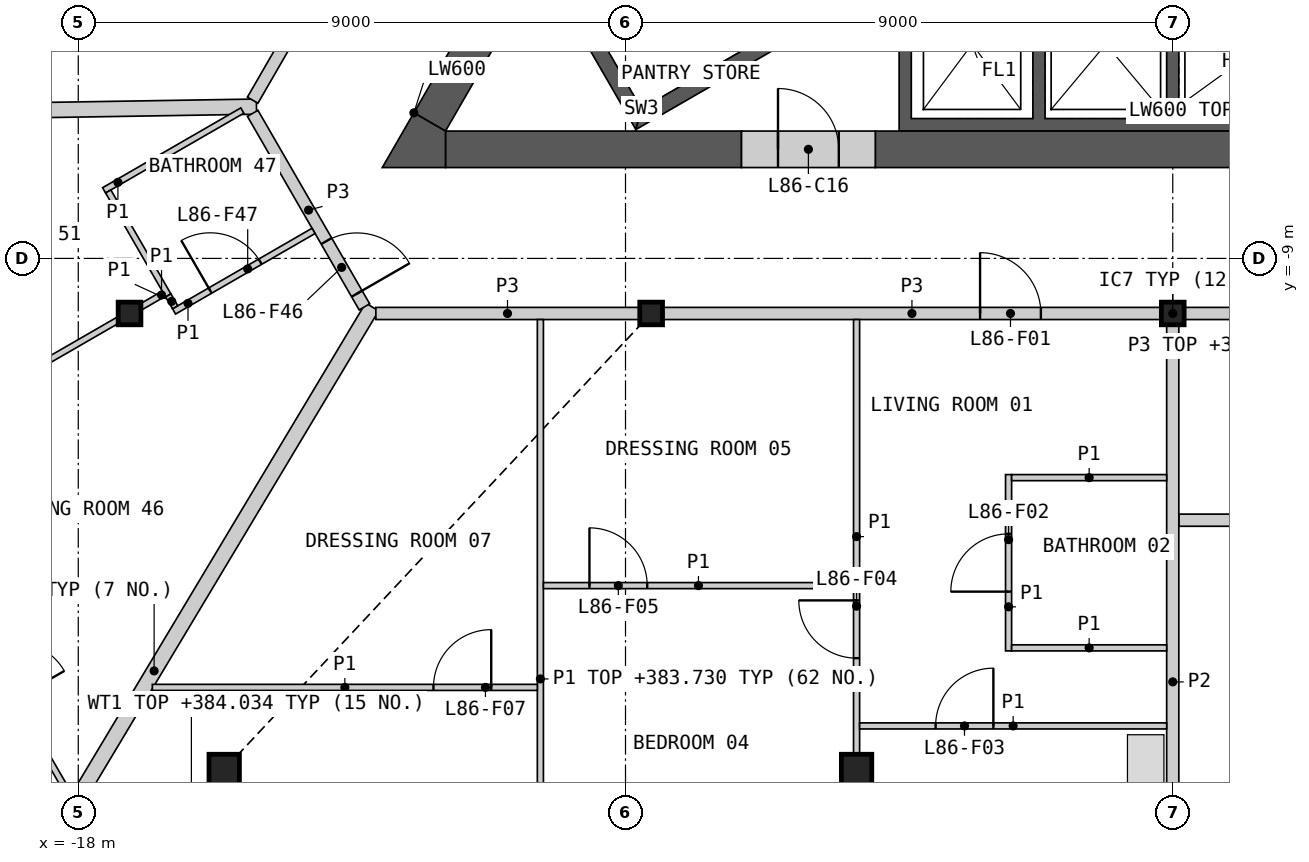
"""IFC4 building model, lengths in metres.
Left out: names, types, materials, properties, quantities, classifications, styles, units other than length and angle.
Written with IfcOpenShell. Run it as: python <this file> out.ifc"""

import sys

from ifc_helpers import new_model, si_unit, direction, frame, frame_2d, origin, origin_2d, place, context, subcontext, project, spatial, polyline, rectangle, hollow_rectangle, i_section, outline, extrude, element, fill, save


model = new_model("IFC4")
c1 = context("Model", 3, precision=1e-05, world=origin(), true_north=direction((0.0, 1.0)))
c2 = subcontext(c1, "Body", "Model", "MODEL_VIEW")
j1 = project(units=[si_unit("LENGTHUNIT", "METRE"), si_unit("PLANEANGLEUNIT", "RADIAN")], contexts=[c1])
p1 = place(None, origin())
s1 = spatial("IfcSite", under=j1, at=p1, CompositionType="ELEMENT")
p2 = place(p1, origin())
s2 = spatial("IfcBuilding", under=s1, at=p2, CompositionType="ELEMENT")
p3 = place(p2, frame((0.0, 0.0, 381.4)))
s3 = spatial("IfcBuildingStorey", under=s2, at=p3, CompositionType="ELEMENT", Elevation=381.4)
for number, where, z_axis, x_axis in (
    (1, (-15.6, -17.406, 0.0), (0.0, 0.0, 1.0), (1.0, 0.0, 0.0)),
    (2, (-5.2, -17.406, 0.0), (0.0, 0.0, 1.0), (1.0, 0.0, 0.0)),
):
    element("IfcColumn", number, at=place(p3, frame(where, z_axis=z_axis, x_axis=x_axis)), inside=s3, PredefinedType="COLUMN", context=c2, shape_type="SweptSolid", body=[
        extrude(hollow_rectangle(XDim=0.5, YDim=0.5, WallThickness=0.03, at=origin_2d()), origin(), (0.0, 0.0, 1.0), 3.4),
    ])
for number, where, z_axis, x_axis in (
    (3, (-17.157, -9.906, 0.0), (0.0, 0.0, 1.0), (1.0, 0.0, 0.0)),
    (4, (-8.578, -9.906, 0.0), (0.0, 0.0, 1.0), (1.0, 0.0, 0.0)),
    (5, (0.0, -9.906, 0.0), (0.0, 0.0, 1.0), (1.0, 0.0, 0.0)),
):
    element("IfcColumn", number, at=place(p3, frame(where, z_axis=z_axis, x_axis=x_axis)), inside=s3, PredefinedType="COLUMN", context=c2, shape_type="SweptSolid", body=[
        extrude(i_section(OverallWidth=0.374, OverallDepth=0.372, WebThickness=0.016, FlangeThickness=0.026, at=origin_2d()), origin(), (0.0, 0.0, 1.0), 3.4),
    ])
p4 = place(p3, origin())
e6 = element("IfcWall", 6, at=p4, inside=s3, PredefinedType="SHEAR", context=c2, shape_type="SweptSolid", body=[
    extrude(outline(polyline([(4.5, -4.4), (4.5, -6.906), (-4.5, -6.906), (-4.5, -4.4), (-4.3, -4.4), (-4.3, -6.7), (-2.3, -6.7), (-2.3, -4.4), (-2.1, -4.4), (-2.1, -6.7), (-0.1, -6.7), (-0.1, -4.4), (0.1, -4.4), (0.1, -6.7), (2.1, -6.7), (2.1, -4.4), (2.3, -4.4), (2.3, -6.7), (4.3, -6.7), (4.3, -4.4), (4.5, -4.4)])), origin(), (0.0, 0.0, 1.0), 3.1),
])
p5 = place(p3, origin())
e7 = element("IfcWall", 7, at=p5, inside=s3, PredefinedType="SHEAR", context=c2, shape_type="SweptSolid", body=[
    extrude(outline(polyline([(-10.374, -4.206), (-8.83, -6.881), (-8.738, -6.539), (-10.032, -4.298), (-10.374, -4.206)])), origin(), (0.0, 0.0, 1.0), 3.1),
])
p6 = place(p3, origin())
e8 = element("IfcWall", 8, at=p6, inside=s3, PredefinedType="SHEAR", context=c2, shape_type="SweptSolid", body=[
    extrude(outline(polyline([(-8.738, -6.539), (-8.83, -6.881), (-3.763, -3.956), (-3.888, -3.739), (-8.738, -6.539)])), origin(), (0.0, 0.0, 1.0), 3.1),
])
p7 = place(p3, frame((-4.892, -7.206, 0.0), z_axis=(0.0, 0.0, 1.0), x_axis=(1.0, 0.0, 0.0)))
e9 = element("IfcWall", 9, at=p7, inside=s3, PredefinedType="SHEAR", context=c2, shape_type="SweptSolid", body=[
    extrude(rectangle(XDim=14.261, YDim=0.6, at=frame_2d((7.13, 0.0))), origin(), (0.0, 0.0, 1.0), 3.1),
])
p8 = place(p3, frame((-11.961, -7.206, 0.0), z_axis=(0.0, 0.0, 1.0), x_axis=(1.0, 0.0, 0.0)))
e10 = element("IfcWall", 10, at=p8, inside=s3, PredefinedType="SHEAR", context=c2, shape_type="SweptSolid", body=[
    extrude(rectangle(XDim=4.868, YDim=0.6, at=frame_2d((2.434, 0.0))), origin(), (0.0, 0.0, 1.0), 3.1),
])
p9 = place(p3, frame((-9.562, -2.15, 0.0), z_axis=(0.0, 0.0, 1.0), x_axis=(-0.500015214976, -0.866016619236, 0.0)))
e11 = element("IfcWall", 11, at=p9, inside=s3, PredefinedType="SHEAR", context=c2, shape_type="SweptSolid", body=[
    extrude(rectangle(XDim=5.318, YDim=0.6, at=frame_2d((2.659, 0.0))), origin(), (0.0, 0.0, 1.0), 3.1),
])
p10 = place(p3, origin())
e12 = element("IfcWall", 12, at=p10, inside=s3, PredefinedType="SHEAR", context=c2, shape_type="SweptSolid", body=[
    extrude(outline(polyline([(-12.48, -6.606), (-11.961, -6.906), (-11.961, -7.506), (-13.0, -7.506), (-12.48, -6.606)])), origin(), (0.0, 0.0, 1.0), 3.1),
])
p11 = place(p3, frame((-7.092, -7.206, 0.0), z_axis=(0.0, 0.0, 1.0), x_axis=(1.0, 0.0, 0.0)))
e13 = element("IfcWall", 13, at=p11, inside=s3, PredefinedType="SHEAR", context=c2, shape_type="SweptSolid", body=[
    extrude(rectangle(XDim=2.2, YDim=0.6, at=frame_2d((1.1, 0.0))), origin(), (0.0, 0.0, 1.0), 3.1),
])
p12 = place(p11, frame((0.6, 0.0, 0.0)))
e14 = element("IfcOpeningElement", 14, at=p12, cuts=e13, PredefinedType="OPENING", context=c2, shape_type="SweptSolid", body=[
    extrude(rectangle(XDim=1.0, YDim=2.1, at=frame_2d((0.5, 1.05))), frame((0.0, 0.31, 0.0), z_axis=(0.0, -1.0, 0.0), x_axis=(1.0, 0.0, 0.0)), (0.0, 0.0, 1.0), 0.62),
])
p13 = place(p3, frame((-20.338, -21.771, 0.0), z_axis=(0.0, 0.0, 1.0), x_axis=(0.513878217441, 0.857863146218, 0.0)))
e15 = element("IfcWall", 15, at=p13, inside=s3, PredefinedType="PARTITIONING", context=c2, shape_type="SweptSolid", body=[
    extrude(rectangle(XDim=13.956, YDim=0.25, at=frame_2d((6.978, 0.0))), origin(), (0.0, 0.0, 1.0), 2.33),
])
p14 = place(p3, frame((-29.269, -6.732, 0.0), z_axis=(0.0, 0.0, 1.0), x_axis=(0.999870533117, 0.016090898164, 0.0)))
e16 = element("IfcWall", 16, at=p14, inside=s3, PredefinedType="PARTITIONING", context=c2, shape_type="SweptSolid", body=[
    extrude(rectangle(XDim=14.202, YDim=0.25, at=frame_2d((7.101, 0.0))), origin(), (0.0, 0.0, 1.0), 2.33),
])
p15 = place(p3, frame((0.197, -9.906, 0.0), z_axis=(0.0, 0.0, 1.0), x_axis=(1.0, 0.0, 0.0)))
e17 = element("IfcWall", 17, at=p15, inside=s3, PredefinedType="PARTITIONING", context=c2, shape_type="SweptSolid", body=[
    extrude(rectangle(XDim=8.185, YDim=0.2, at=frame_2d((4.092, 0.0))), origin(), (0.0, 0.0, 1.0), 3.1),
])
p16 = place(p15, frame((3.567, 0.0, 0.0)))
e18 = element("IfcOpeningElement", 18, at=p16, cuts=e17, PredefinedType="OPENING", context=c2, shape_type="SweptSolid", body=[
    extrude(rectangle(XDim=0.95, YDim=2.1, at=frame_2d((0.475, 1.05))), frame((0.0, 0.11, 0.0), z_axis=(0.0, -1.0, 0.0), x_axis=(1.0, 0.0, 0.0)), (0.0, 0.0, 1.0), 0.22),
])
p17 = place(p3, frame((-8.382, -9.906, 0.0), z_axis=(0.0, 0.0, 1.0), x_axis=(1.0, 0.0, 0.0)))
e19 = element("IfcWall", 19, at=p17, inside=s3, PredefinedType="PARTITIONING", context=c2, shape_type="SweptSolid", body=[
    extrude(rectangle(XDim=8.185, YDim=0.2, at=frame_2d((4.092, 0.0))), origin(), (0.0, 0.0, 1.0), 3.1),
])
p18 = place(p17, frame((5.213, 0.0, 0.0)))
e20 = element("IfcOpeningElement", 20, at=p18, cuts=e19, PredefinedType="OPENING", context=c2, shape_type="SweptSolid", body=[
    extrude(rectangle(XDim=1.0, YDim=2.1, at=frame_2d((0.5, 1.05))), frame((0.0, 0.11, 0.0), z_axis=(0.0, -1.0, 0.0), x_axis=(1.0, 0.0, 0.0)), (0.0, 0.0, 1.0), 0.22),
])
p19 = place(p3, frame((-13.106, -9.906, 0.0), z_axis=(0.0, 0.0, 1.0), x_axis=(1.0, 0.0, 0.0)))
e21 = element("IfcWall", 21, at=p19, inside=s3, PredefinedType="PARTITIONING", context=c2, shape_type="SweptSolid", body=[
    extrude(rectangle(XDim=4.331, YDim=0.2, at=frame_2d((2.165, 0.0))), origin(), (0.0, 0.0, 1.0), 3.1),
])
p20 = place(p3, frame((-15.131, -6.397, 0.0), z_axis=(0.0, 0.0, 1.0), x_axis=(0.499986217557, 0.866033360935, 0.0)))
e22 = element("IfcWall", 22, at=p20, inside=s3, PredefinedType="PARTITIONING", context=c2, shape_type="SweptSolid", body=[
    extrude(rectangle(XDim=4.3, YDim=0.2, at=frame_2d((2.15, 0.0))), origin(), (0.0, 0.0, 1.0), 3.1),
])
p21 = place(p3, frame((-15.131, -6.614, 0.0), z_axis=(0.0, 0.0, 1.0), x_axis=(0.499967746641, -0.866044024469, 0.0)))
e23 = element("IfcWall", 23, at=p21, inside=s3, PredefinedType="PARTITIONING", context=c2, shape_type="SweptSolid", body=[
    extrude(rectangle(XDim=3.676, YDim=0.2, at=frame_2d((1.838, 0.0))), origin(), (0.0, 0.0, 1.0), 3.1),
])
p22 = place(p21, frame((2.426, 0.0, 0.0)))
e24 = element("IfcOpeningElement", 24, at=p22, cuts=e23, PredefinedType="OPENING", context=c2, shape_type="SweptSolid", body=[
    extrude(rectangle(XDim=1.0, YDim=2.1, at=frame_2d((0.5, 1.05))), frame((0.0, 0.11, 0.0), z_axis=(0.0, -1.0, 0.0), x_axis=(1.0, 0.0, 0.0)), (0.0, 0.0, 1.0), 0.22),
])
p23 = place(p3, frame((0.1, -13.306, 0.0), z_axis=(0.0, 0.0, 1.0), x_axis=(1.0, 0.0, 0.0)))
e25 = element("IfcWall", 25, at=p23, inside=s3, PredefinedType="PARTITIONING", context=c2, shape_type="SweptSolid", body=[
    extrude(rectangle(XDim=15.094, YDim=0.2, at=frame_2d((7.547, 0.0))), origin(), (0.0, 0.0, 1.0), 2.33),
])
p24 = place(p23, frame((9.781, 0.0, 0.0)))
e26 = element("IfcOpeningElement", 26, at=p24, cuts=e25, PredefinedType="OPENING", context=c2, shape_type="SweptSolid", body=[
    extrude(rectangle(XDim=0.95, YDim=2.1, at=frame_2d((0.475, 1.05))), frame((0.0, 0.11, 0.0), z_axis=(0.0, -1.0, 0.0), x_axis=(1.0, 0.0, 0.0)), (0.0, 0.0, 1.0), 0.22),
])
p25 = place(p3, frame((0.0, -21.828, 0.0), z_axis=(0.0, 0.0, 1.0), x_axis=(0.0, 1.0, 0.0)))
e27 = element("IfcWall", 27, at=p25, inside=s3, PredefinedType="PARTITIONING", context=c2, shape_type="SweptSolid", body=[
    extrude(rectangle(XDim=11.725, YDim=0.2, at=frame_2d((5.863, 0.0))), origin(), (0.0, 0.0, 1.0), 2.33),
])
p26 = place(p3, frame((-10.4, -21.828, 0.0), z_axis=(0.0, 0.0, 1.0), x_axis=(0.0, 1.0, 0.0)))
e28 = element("IfcWall", 28, at=p26, inside=s3, PredefinedType="PARTITIONING", context=c2, shape_type="SweptSolid", body=[
    extrude(rectangle(XDim=11.822, YDim=0.1, at=frame_2d((5.911, 0.0))), origin(), (0.0, 0.0, 1.0), 2.33),
])
p27 = place(p26, frame((1.156, 0.0, 0.0)))
e29 = element("IfcOpeningElement", 29, at=p27, cuts=e28, PredefinedType="OPENING", context=c2, shape_type="SweptSolid", body=[
    extrude(rectangle(XDim=0.95, YDim=2.1, at=frame_2d((0.475, 1.05))), frame((0.0, 0.06, 0.0), z_axis=(0.0, -1.0, 0.0), x_axis=(1.0, 0.0, 0.0)), (0.0, 0.0, 1.0), 0.12),
])
p28 = place(p3, frame((-26.777, -15.46, 0.0), z_axis=(0.0, 0.0, 1.0), x_axis=(0.866019680922, 0.500009912158, 0.0)))
e30 = element("IfcWall", 30, at=p28, inside=s3, PredefinedType="PARTITIONING", context=c2, shape_type="SweptSolid", body=[
    extrude(rectangle(XDim=10.881, YDim=0.1, at=frame_2d((5.44, 0.0))), origin(), (0.0, 0.0, 1.0), 2.33),
])
p29 = place(p28, frame((1.454, 0.0, 0.0)))
e31 = element("IfcOpeningElement", 31, at=p29, cuts=e30, PredefinedType="OPENING", context=c2, shape_type="SweptSolid", body=[
    extrude(rectangle(XDim=0.95, YDim=2.1, at=frame_2d((0.475, 1.05))), frame((0.0, 0.06, 0.0), z_axis=(0.0, -1.0, 0.0), x_axis=(1.0, 0.0, 0.0)), (0.0, 0.0, 1.0), 0.12),
])
p30 = place(p3, frame((-5.2, -17.146, 0.0), z_axis=(0.0, 0.0, 1.0), x_axis=(0.0, 1.0, 0.0)))
e32 = element("IfcWall", 32, at=p30, inside=s3, PredefinedType="PARTITIONING", context=c2, shape_type="SweptSolid", body=[
    extrude(rectangle(XDim=7.14, YDim=0.1, at=frame_2d((3.57, 0.0))), origin(), (0.0, 0.0, 1.0), 2.33),
])
p31 = place(p30, frame((1.571, 0.0, 0.0)))
e33 = element("IfcOpeningElement", 33, at=p31, cuts=e32, PredefinedType="OPENING", context=c2, shape_type="SweptSolid", body=[
    extrude(rectangle(XDim=0.95, YDim=2.1, at=frame_2d((0.475, 1.05))), frame((0.0, 0.06, 0.0), z_axis=(0.0, -1.0, 0.0), x_axis=(1.0, 0.0, 0.0)), (0.0, 0.0, 1.0), 0.12),
])
p32 = place(p3, frame((-21.304, -12.358, 0.0), z_axis=(0.0, 0.0, 1.0), x_axis=(0.500000558108, -0.866025081561, 0.0)))
e34 = element("IfcWall", 34, at=p32, inside=s3, PredefinedType="PARTITIONING", context=c2, shape_type="SweptSolid", body=[
    extrude(rectangle(XDim=6.358, YDim=0.1, at=frame_2d((3.179, 0.0))), origin(), (0.0, 0.0, 1.0), 2.33),
])
p33 = place(p32, frame((3.555, 0.0, 0.0)))
e35 = element("IfcOpeningElement", 35, at=p33, cuts=e34, PredefinedType="OPENING", context=c2, shape_type="SweptSolid", body=[
    extrude(rectangle(XDim=0.95, YDim=2.1, at=frame_2d((0.475, 1.05))), frame((0.0, 0.06, 0.0), z_axis=(0.0, -1.0, 0.0), x_axis=(1.0, 0.0, 0.0)), (0.0, 0.0, 1.0), 0.12),
])
p34 = place(p3, frame((-16.781, -16.055, 0.0), z_axis=(0.0, 0.0, 1.0), x_axis=(1.0, 0.0, 0.0)))
e36 = element("IfcWall", 36, at=p34, inside=s3, PredefinedType="PARTITIONING", context=c2, shape_type="SweptSolid", body=[
    extrude(rectangle(XDim=6.332, YDim=0.1, at=frame_2d((3.166, 0.0))), origin(), (0.0, 0.0, 1.0), 2.33),
])
p35 = place(p34, frame((4.623, 0.0, 0.0)))
e37 = element("IfcOpeningElement", 37, at=p35, cuts=e36, PredefinedType="OPENING", context=c2, shape_type="SweptSolid", body=[
    extrude(rectangle(XDim=0.95, YDim=2.1, at=frame_2d((0.475, 1.05))), frame((0.0, 0.06, 0.0), z_axis=(0.0, -1.0, 0.0), x_axis=(1.0, 0.0, 0.0)), (0.0, 0.0, 1.0), 0.12),
])
p36 = place(p3, frame((-5.15, -16.689, 0.0), z_axis=(0.0, 0.0, 1.0), x_axis=(1.0, 0.0, 0.0)))
e38 = element("IfcWall", 38, at=p36, inside=s3, PredefinedType="PARTITIONING", context=c2, shape_type="SweptSolid", body=[
    extrude(rectangle(XDim=5.05, YDim=0.1, at=frame_2d((2.525, 0.0))), origin(), (0.0, 0.0, 1.0), 2.33),
])
p37 = place(p36, frame((1.25, 0.0, 0.0)))
e39 = element("IfcOpeningElement", 39, at=p37, cuts=e38, PredefinedType="OPENING", context=c2, shape_type="SweptSolid", body=[
    extrude(rectangle(XDim=0.95, YDim=2.1, at=frame_2d((0.475, 1.05))), frame((0.0, 0.06, 0.0), z_axis=(0.0, -1.0, 0.0), x_axis=(1.0, 0.0, 0.0)), (0.0, 0.0, 1.0), 0.12),
])
p38 = place(p3, frame((-10.35, -14.382, 0.0), z_axis=(0.0, 0.0, 1.0), x_axis=(1.0, 0.0, 0.0)))
e40 = element("IfcWall", 40, at=p38, inside=s3, PredefinedType="PARTITIONING", context=c2, shape_type="SweptSolid", body=[
    extrude(rectangle(XDim=5.1, YDim=0.1, at=frame_2d((2.55, 0.0))), origin(), (0.0, 0.0, 1.0), 2.33),
])
p39 = place(p38, frame((0.757, 0.0, 0.0)))
e41 = element("IfcOpeningElement", 41, at=p39, cuts=e40, PredefinedType="OPENING", context=c2, shape_type="SweptSolid", body=[
    extrude(rectangle(XDim=0.95, YDim=2.1, at=frame_2d((0.475, 1.05))), frame((0.0, 0.06, 0.0), z_axis=(0.0, -1.0, 0.0), x_axis=(1.0, 0.0, 0.0)), (0.0, 0.0, 1.0), 0.12),
])
p40 = place(p3, frame((-2.7, -15.456, 0.0), z_axis=(0.0, 0.0, 1.0), x_axis=(0.0, 1.0, 0.0)))
e42 = element("IfcWall", 42, at=p40, inside=s3, PredefinedType="PARTITIONING", context=c2, shape_type="SweptSolid", body=[
    extrude(rectangle(XDim=2.9, YDim=0.1, at=frame_2d((1.45, 0.0))), origin(), (0.0, 0.0, 1.0), 2.33),
])
p41 = place(p40, frame((0.975, 0.0, 0.0)))
e43 = element("IfcOpeningElement", 43, at=p41, cuts=e42, PredefinedType="OPENING", context=c2, shape_type="SweptSolid", body=[
    extrude(rectangle(XDim=0.95, YDim=2.1, at=frame_2d((0.475, 1.05))), frame((0.0, 0.06, 0.0), z_axis=(0.0, -1.0, 0.0), x_axis=(1.0, 0.0, 0.0)), (0.0, 0.0, 1.0), 0.12),
])
for number, where, z_axis, x_axis in (
    (44, (-2.65, -12.606, 0.0), (0.0, 0.0, 1.0), (1.0, 0.0, 0.0)),
    (45, (-2.65, -15.406, 0.0), (0.0, 0.0, 1.0), (1.0, 0.0, 0.0)),
):
    element("IfcWall", number, at=place(p3, frame(where, z_axis=z_axis, x_axis=x_axis)), inside=s3, PredefinedType="PARTITIONING", context=c2, shape_type="SweptSolid", body=[
        extrude(rectangle(XDim=2.55, YDim=0.1, at=frame_2d((1.275, 0.0))), origin(), (0.0, 0.0, 1.0), 2.33),
    ])
p42 = place(p3, frame((-17.575, -7.881, 0.0), z_axis=(0.0, 0.0, 1.0), x_axis=(0.866036909293, 0.499980071345, 0.0)))
e46 = element("IfcWall", 46, at=p42, inside=s3, PredefinedType="PARTITIONING", context=c2, shape_type="SweptSolid", body=[
    extrude(rectangle(XDim=2.625, YDim=0.1, at=frame_2d((1.312, 0.0))), origin(), (0.0, 0.0, 1.0), 2.33),
])
p43 = place(p3, frame((-16.425, -9.872, 0.0), z_axis=(0.0, 0.0, 1.0), x_axis=(0.86603978909, 0.499975083092, 0.0)))
e47 = element("IfcWall", 47, at=p43, inside=s3, PredefinedType="PARTITIONING", context=c2, shape_type="SweptSolid", body=[
    extrude(rectangle(XDim=2.649, YDim=0.1, at=frame_2d((1.325, 0.0))), origin(), (0.0, 0.0, 1.0), 2.33),
])
p44 = place(p43, frame((0.686, 0.0, 0.0)))
e48 = element("IfcOpeningElement", 48, at=p44, cuts=e47, PredefinedType="OPENING", context=c2, shape_type="SweptSolid", body=[
    extrude(rectangle(XDim=0.95, YDim=2.1, at=frame_2d((0.475, 1.05))), frame((0.0, 0.06, 0.0), z_axis=(0.0, -1.0, 0.0), x_axis=(1.0, 0.0, 0.0)), (0.0, 0.0, 1.0), 0.12),
])
p45 = place(p3, frame((-17.507, -7.899, 0.0), z_axis=(0.0, 0.0, 1.0), x_axis=(0.500011643316, -0.866018681408, 0.0)))
e49 = element("IfcWall", 49, at=p45, inside=s3, PredefinedType="PARTITIONING", context=c2, shape_type="SweptSolid", body=[
    extrude(rectangle(XDim=1.973, YDim=0.1, at=frame_2d((0.987, 0.0))), origin(), (0.0, 0.0, 1.0), 2.33),
])
p46 = place(p3, frame((-16.96, -9.792, 0.0), z_axis=(0.0, 0.0, 1.0), x_axis=(0.866137484628, 0.499805820016, 0.0)))
e50 = element("IfcWall", 50, at=p46, inside=s3, PredefinedType="PARTITIONING", context=c2, shape_type="SweptSolid", body=[
    extrude(rectangle(XDim=0.423, YDim=0.1, at=frame_2d((0.211, 0.0))), origin(), (0.0, 0.0, 1.0), 2.33),
])
p47 = place(p3, frame((-16.519, -9.61, 0.0), z_axis=(0.0, 0.0, 1.0), x_axis=(0.50245032488, -0.864606078528, 0.0)))
e51 = element("IfcWall", 51, at=p47, inside=s3, PredefinedType="PARTITIONING", context=c2, shape_type="SweptSolid", body=[
    extrude(rectangle(XDim=0.224, YDim=0.1, at=frame_2d((0.112, 0.0))), origin(), (0.0, 0.0, 1.0), 2.33),
])
p48 = place(p12, origin())
e52 = element("IfcDoor", 52, at=p48, inside=s3, OperationType="SINGLE_SWING_LEFT", PredefinedType="DOOR", context=c2, shape_type="SweptSolid", body=[
    extrude(rectangle(XDim=1.0, YDim=2.1, at=frame_2d((0.5, 1.05))), frame((0.0, 0.055, 0.0), z_axis=(0.0, -1.0, 0.0), x_axis=(1.0, 0.0, 0.0)), (0.0, 0.0, 1.0), 0.05),
])
fill(e14, e52)
p49 = place(p18, origin())
e53 = element("IfcDoor", 53, at=p49, inside=s3, OperationType="SINGLE_SWING_LEFT", PredefinedType="DOOR", context=c2, shape_type="SweptSolid", body=[
    extrude(rectangle(XDim=1.0, YDim=2.1, at=frame_2d((0.5, 1.05))), frame((0.0, 0.025, 0.0), z_axis=(0.0, -1.0, 0.0), x_axis=(1.0, 0.0, 0.0)), (0.0, 0.0, 1.0), 0.05),
])
fill(e20, e53)
p50 = place(p41, origin())
e54 = element("IfcDoor", 54, at=p50, inside=s3, OperationType="SINGLE_SWING_LEFT", PredefinedType="DOOR", context=c2, shape_type="SweptSolid", body=[
    extrude(rectangle(XDim=0.95, YDim=2.1, at=frame_2d((0.475, 1.05))), frame((0.0, 0.025, 0.0), z_axis=(0.0, -1.0, 0.0), x_axis=(1.0, 0.0, 0.0)), (0.0, 0.0, 1.0), 0.05),
])
fill(e43, e54)
p51 = place(p37, origin())
e55 = element("IfcDoor", 55, at=p51, inside=s3, OperationType="SINGLE_SWING_RIGHT", PredefinedType="DOOR", context=c2, shape_type="SweptSolid", body=[
    extrude(rectangle(XDim=0.95, YDim=2.1, at=frame_2d((0.475, 1.05))), frame((0.0, 0.025, 0.0), z_axis=(0.0, -1.0, 0.0), x_axis=(1.0, 0.0, 0.0)), (0.0, 0.0, 1.0), 0.05),
])
fill(e39, e55)
p52 = place(p31, origin())
e56 = element("IfcDoor", 56, at=p52, inside=s3, OperationType="SINGLE_SWING_RIGHT", PredefinedType="DOOR", context=c2, shape_type="SweptSolid", body=[
    extrude(rectangle(XDim=0.95, YDim=2.1, at=frame_2d((0.475, 1.05))), frame((0.0, 0.025, 0.0), z_axis=(0.0, -1.0, 0.0), x_axis=(1.0, 0.0, 0.0)), (0.0, 0.0, 1.0), 0.05),
])
fill(e33, e56)
p53 = place(p39, origin())
e57 = element("IfcDoor", 57, at=p53, inside=s3, OperationType="SINGLE_SWING_LEFT", PredefinedType="DOOR", context=c2, shape_type="SweptSolid", body=[
    extrude(rectangle(XDim=0.95, YDim=2.1, at=frame_2d((0.475, 1.05))), frame((0.0, 0.025, 0.0), z_axis=(0.0, -1.0, 0.0), x_axis=(1.0, 0.0, 0.0)), (0.0, 0.0, 1.0), 0.05),
])
fill(e41, e57)
p54 = place(p35, origin())
e58 = element("IfcDoor", 58, at=p54, inside=s3, OperationType="SINGLE_SWING_RIGHT", PredefinedType="DOOR", context=c2, shape_type="SweptSolid", body=[
    extrude(rectangle(XDim=0.95, YDim=2.1, at=frame_2d((0.475, 1.05))), frame((0.0, 0.025, 0.0), z_axis=(0.0, -1.0, 0.0), x_axis=(1.0, 0.0, 0.0)), (0.0, 0.0, 1.0), 0.05),
])
fill(e37, e58)
p55 = place(p22, origin())
e59 = element("IfcDoor", 59, at=p55, inside=s3, OperationType="SINGLE_SWING_RIGHT", PredefinedType="DOOR", context=c2, shape_type="SweptSolid", body=[
    extrude(rectangle(XDim=1.0, YDim=2.1, at=frame_2d((0.5, 1.05))), frame((0.0, 0.025, 0.0), z_axis=(0.0, -1.0, 0.0), x_axis=(1.0, 0.0, 0.0)), (0.0, 0.0, 1.0), 0.05),
])
fill(e24, e59)
p56 = place(p44, origin())
e60 = element("IfcDoor", 60, at=p56, inside=s3, OperationType="SINGLE_SWING_LEFT", PredefinedType="DOOR", context=c2, shape_type="SweptSolid", body=[
    extrude(rectangle(XDim=0.95, YDim=2.1, at=frame_2d((0.475, 1.05))), frame((0.0, 0.025, 0.0), z_axis=(0.0, -1.0, 0.0), x_axis=(1.0, 0.0, 0.0)), (0.0, 0.0, 1.0), 0.05),
])
fill(e48, e60)
save(model, sys.argv[1])
